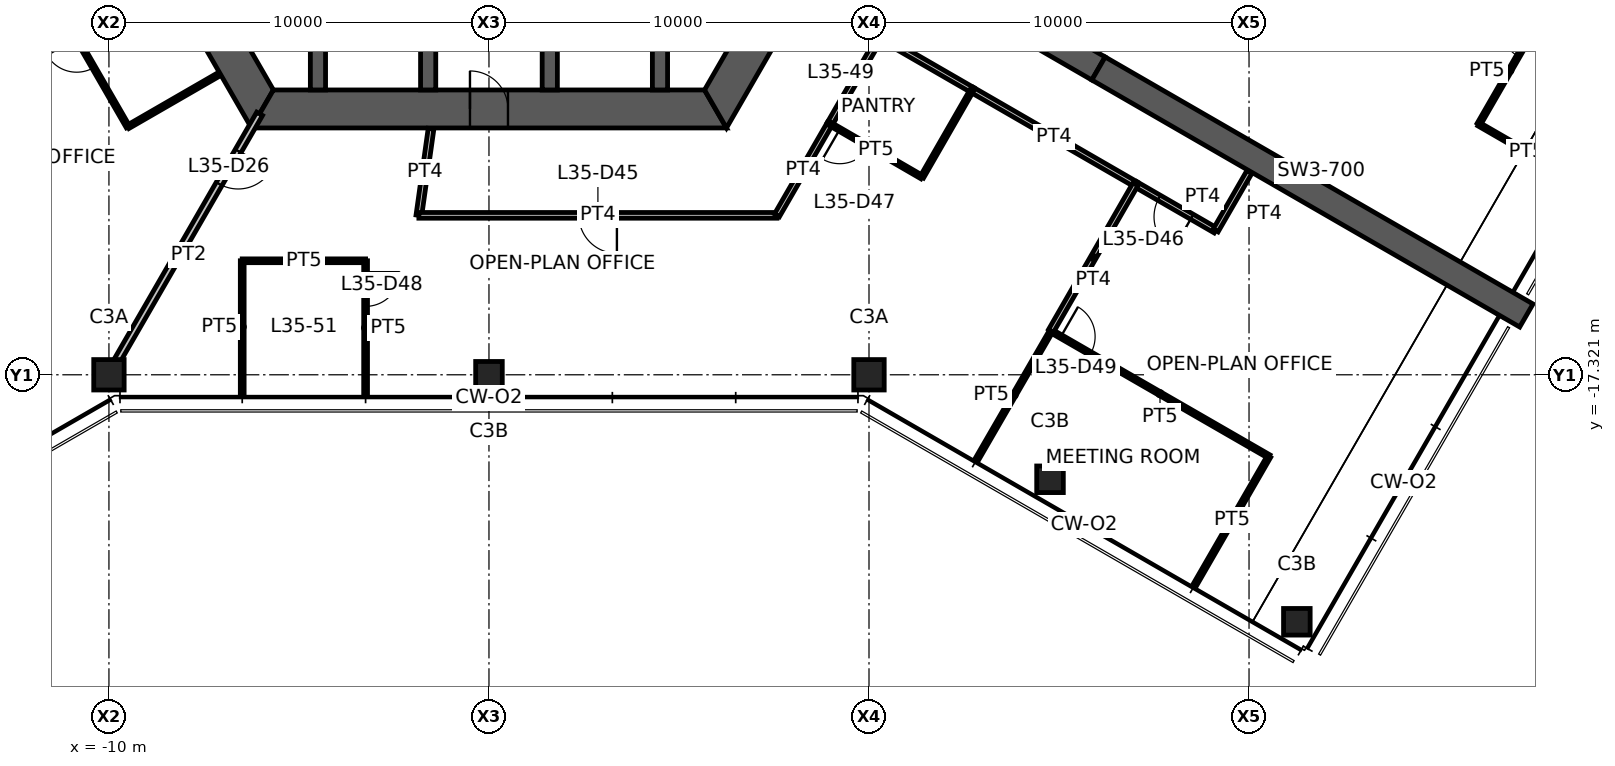
"""IFC4 building model, lengths in metres.
Left out: names, types, materials, properties, quantities, classifications, styles, units other than length and angle.
Written with IfcOpenShell. Run it as: python <this file> out.ifc"""

import sys

from ifc_helpers import new_model, si_unit, direction, frame, frame_2d, origin, origin_2d, place, context, subcontext, project, spatial, polyline, rectangle, hollow_rectangle, outline, extrude, element, fill, save


model = new_model("IFC4")
c1 = context("Model", 3, precision=1e-05, world=origin(), true_north=direction((0.0, 1.0)))
c2 = subcontext(c1, "Body", "Model", "MODEL_VIEW")
j1 = project(units=[si_unit("LENGTHUNIT", "METRE"), si_unit("PLANEANGLEUNIT", "RADIAN")], contexts=[c1])
p1 = place(None, origin())
s1 = spatial("IfcSite", under=j1, at=p1, CompositionType="ELEMENT")
p2 = place(p1, origin())
s2 = spatial("IfcBuilding", under=s1, at=p2, CompositionType="ELEMENT")
p3 = place(p2, frame((0.0, 0.0, 140.9)))
s3 = spatial("IfcBuildingStorey", under=s2, at=p3, CompositionType="ELEMENT", Elevation=140.9)
for number, where, z_axis, x_axis in (
    (1, (-10.0, -17.321, 0.0), (0.0, 0.0, 1.0), (1.0, 0.0, 0.0)),
    (2, (10.0, -17.321, 0.0), (0.0, 0.0, 1.0), (1.0, 0.0, 0.0)),
):
    element("IfcColumn", number, at=place(p3, frame(where, z_axis=z_axis, x_axis=x_axis)), inside=s3, PredefinedType="COLUMN", context=c2, shape_type="SweptSolid", body=[
        extrude(hollow_rectangle(XDim=0.8, YDim=0.8, WallThickness=0.045, at=origin_2d()), origin(), (0.0, 0.0, 1.0), 3.9),
    ])
for number, where, z_axis, x_axis in (
    (3, (0.0, -17.321, 0.0), (0.0, 0.0, 1.0), (1.0, 0.0, 0.0)),
    (4, (14.763, -20.071, 0.0), (0.0, 0.0, 1.0), (1.0, 0.0, 0.0)),
    (5, (21.258, -23.821, 0.0), (0.0, 0.0, 1.0), (1.0, 0.0, 0.0)),
):
    element("IfcColumn", number, at=place(p3, frame(where, z_axis=z_axis, x_axis=x_axis)), inside=s3, PredefinedType="COLUMN", context=c2, shape_type="SweptSolid", body=[
        extrude(hollow_rectangle(XDim=0.7, YDim=0.7, WallThickness=0.036, at=origin_2d()), origin(), (0.0, 0.0, 1.0), 3.9),
    ])
p4 = place(p3, frame((-11.922, 0.0, 0.0), z_axis=(0.0, 0.0, 1.0), x_axis=(0.500004296715, -0.866022923061, 0.0)))
e6 = element("IfcWall", 6, at=p4, inside=s3, PredefinedType="SHEAR", context=c2, shape_type="SweptSolid", body=[
    extrude(outline(polyline([(-0.289, -0.5), (6.331, -0.5), (7.131, -0.5), (12.211, -0.5), (11.634, 0.5), (7.131, 0.5), (6.331, 0.5), (0.289, 0.5), (-0.289, -0.5)])), origin(), (0.0, 0.0, 1.0), 3.9),
])
p5 = place(p4, frame((6.331, 0.0, 0.0)))
e7 = element("IfcOpeningElement", 7, at=p5, cuts=e6, PredefinedType="OPENING", context=c2, shape_type="SweptSolid", body=[
    extrude(rectangle(XDim=0.8, YDim=2.1, at=frame_2d((0.4, 1.05))), frame((0.0, 0.51, 0.0), z_axis=(0.0, -1.0, 0.0), x_axis=(1.0, 0.0, 0.0)), (0.0, 0.0, 1.0), 1.02),
])
p6 = place(p3, frame((-5.961, -10.325, 0.0), z_axis=(0.0, 0.0, 1.0), x_axis=(1.0, 0.0, 0.0)))
e8 = element("IfcWall", 8, at=p6, inside=s3, PredefinedType="SHEAR", context=c2, shape_type="SweptSolid", body=[
    extrude(outline(polyline([(-0.289, -0.5), (5.461, -0.5), (6.461, -0.5), (12.211, -0.5), (11.634, 0.5), (6.461, 0.5), (5.461, 0.5), (0.289, 0.5), (-0.289, -0.5)])), origin(), (0.0, 0.0, 1.0), 3.9),
])
p7 = place(p6, frame((5.461, 0.0, 0.0)))
e9 = element("IfcOpeningElement", 9, at=p7, cuts=e8, PredefinedType="OPENING", context=c2, shape_type="SweptSolid", body=[
    extrude(rectangle(XDim=1.0, YDim=2.1, at=frame_2d((0.5, 1.05))), frame((0.0, 0.51, 0.0), z_axis=(0.0, -1.0, 0.0), x_axis=(1.0, 0.0, 0.0)), (0.0, 0.0, 1.0), 1.02),
])
p8 = place(p3, frame((5.961, -10.325, 0.0), z_axis=(0.0, 0.0, 1.0), x_axis=(0.500004296715, 0.866022923061, 0.0)))
e10 = element("IfcWall", 10, at=p8, inside=s3, PredefinedType="SHEAR", context=c2, shape_type="SweptSolid", body=[
    extrude(outline(polyline([(-0.289, -0.5), (4.594, -0.5), (5.394, -0.5), (12.211, -0.5), (11.634, 0.5), (5.394, 0.5), (4.594, 0.5), (0.289, 0.5), (-0.289, -0.5)])), origin(), (0.0, 0.0, 1.0), 3.9),
])
p9 = place(p8, frame((4.594, 0.0, 0.0)))
e11 = element("IfcOpeningElement", 11, at=p9, cuts=e10, PredefinedType="OPENING", context=c2, shape_type="SweptSolid", body=[
    extrude(rectangle(XDim=0.8, YDim=2.1, at=frame_2d((0.4, 1.05))), frame((0.0, 0.51, 0.0), z_axis=(0.0, -1.0, 0.0), x_axis=(1.0, 0.0, 0.0)), (0.0, 0.0, 1.0), 1.02),
])
p10 = place(p3, frame((-9.375, -5.413, 0.0), z_axis=(0.0, 0.0, 1.0), x_axis=(-0.866032377459, -0.499987921047, 0.0)))
e12 = element("IfcWall", 12, at=p10, inside=s3, PredefinedType="SHEAR", context=c2, shape_type="SweptSolid", body=[
    extrude(rectangle(XDim=7.696, YDim=0.7, at=frame_2d((3.848, 0.0))), origin(), (0.0, 0.0, 1.0), 3.9),
])
p11 = place(p10, frame((0.9, 0.0, 0.0)))
e13 = element("IfcOpeningElement", 13, at=p11, cuts=e12, PredefinedType="OPENING", context=c2, shape_type="SweptSolid", body=[
    extrude(rectangle(XDim=1.0, YDim=2.1, at=frame_2d((0.5, 1.05))), frame((0.0, 0.36, 0.0), z_axis=(0.0, -1.0, 0.0), x_axis=(1.0, 0.0, 0.0)), (0.0, 0.0, 1.0), 0.72),
])
p12 = place(p3, frame((9.375, -5.413, 0.0), z_axis=(0.0, 0.0, 1.0), x_axis=(0.866032377459, -0.499987921047, 0.0)))
e14 = element("IfcWall", 14, at=p12, inside=s3, PredefinedType="SHEAR", context=c2, shape_type="SweptSolid", body=[
    extrude(rectangle(XDim=7.696, YDim=0.7, at=frame_2d((3.848, 0.0))), origin(), (0.0, 0.0, 1.0), 3.9),
])
p13 = place(p12, frame((0.9, 0.0, 0.0)))
e15 = element("IfcOpeningElement", 15, at=p13, cuts=e14, PredefinedType="OPENING", context=c2, shape_type="SweptSolid", body=[
    extrude(rectangle(XDim=1.0, YDim=2.1, at=frame_2d((0.5, 1.05))), frame((0.0, 0.36, 0.0), z_axis=(0.0, -1.0, 0.0), x_axis=(1.0, 0.0, 0.0)), (0.0, 0.0, 1.0), 0.72),
])
p14 = place(p3, frame((16.039, -9.26, 0.0), z_axis=(0.0, 0.0, 1.0), x_axis=(0.866024837091, -0.50000098154, 0.0)))
e16 = element("IfcWall", 16, at=p14, inside=s3, PredefinedType="SHEAR", context=c2, shape_type="SweptSolid", body=[
    extrude(rectangle(XDim=13.0, YDim=0.7, at=frame_2d((6.5, 0.0))), origin(), (0.0, 0.0, 1.0), 3.9),
])
p15 = place(p3, frame((-1.6, -3.8, 0.0), z_axis=(0.0, 0.0, 1.0), x_axis=(0.0, -1.0, 0.0)))
e17 = element("IfcWall", 17, at=p15, inside=s3, PredefinedType="SHEAR", context=c2, shape_type="SweptSolid", body=[
    extrude(rectangle(XDim=6.025, YDim=0.4, at=frame_2d((3.012, 0.0))), origin(), (0.0, 0.0, 1.0), 3.9),
])
p16 = place(p15, frame((3.75, 0.0, 0.0)))
e18 = element("IfcOpeningElement", 18, at=p16, cuts=e17, PredefinedType="OPENING", context=c2, shape_type="SweptSolid", body=[
    extrude(rectangle(XDim=0.9, YDim=2.1, at=frame_2d((0.45, 1.05))), frame((0.0, 0.21, 0.0), z_axis=(0.0, -1.0, 0.0), x_axis=(1.0, 0.0, 0.0)), (0.0, 0.0, 1.0), 0.42),
])
p17 = place(p3, frame((1.6, -3.8, 0.0), z_axis=(0.0, 0.0, 1.0), x_axis=(0.0, -1.0, 0.0)))
e19 = element("IfcWall", 19, at=p17, inside=s3, PredefinedType="SHEAR", context=c2, shape_type="SweptSolid", body=[
    extrude(rectangle(XDim=6.025, YDim=0.4, at=frame_2d((3.012, 0.0))), origin(), (0.0, 0.0, 1.0), 3.9),
])
p18 = place(p17, frame((3.6, 0.0, 0.0)))
e20 = element("IfcOpeningElement", 20, at=p18, cuts=e19, PredefinedType="OPENING", context=c2, shape_type="SweptSolid", body=[
    extrude(rectangle(XDim=1.2, YDim=2.1, at=frame_2d((0.6, 1.05))), frame((0.0, 0.21, 0.0), z_axis=(0.0, -1.0, 0.0), x_axis=(1.0, 0.0, 0.0)), (0.0, 0.0, 1.0), 0.42),
])
for number, where, z_axis, x_axis in (
    (21, (-4.5, -3.8, 0.0), (0.0, 0.0, 1.0), (0.0, -1.0, 0.0)),
    (22, (4.5, -3.8, 0.0), (0.0, 0.0, 1.0), (0.0, -1.0, 0.0)),
):
    element("IfcWall", number, at=place(p3, frame(where, z_axis=z_axis, x_axis=x_axis)), inside=s3, PredefinedType="SHEAR", context=c2, shape_type="SweptSolid", body=[
        extrude(rectangle(XDim=6.025, YDim=0.4, at=frame_2d((3.012, 0.0))), origin(), (0.0, 0.0, 1.0), 3.9),
    ])
p19 = place(p3, frame((-6.035, -10.453, 0.0), z_axis=(0.0, 0.0, 1.0), x_axis=(-0.499989830942, -0.866031274813, 0.0)))
e23 = element("IfcWall", 23, at=p19, inside=s3, PredefinedType="PARTITIONING", context=c2, shape_type="SweptSolid", body=[
    extrude(rectangle(XDim=7.93, YDim=0.175, at=frame_2d((3.965, 0.0))), origin(), (0.0, 0.0, 1.0), 3.05),
])
p20 = place(p19, frame((1.13, 0.0, 0.0)))
e24 = element("IfcOpeningElement", 24, at=p20, cuts=e23, PredefinedType="OPENING", context=c2, shape_type="SweptSolid", body=[
    extrude(rectangle(XDim=1.0, YDim=2.1, at=frame_2d((0.5, 1.05))), frame((0.0, 0.098, 0.0), z_axis=(0.0, -1.0, 0.0), x_axis=(1.0, 0.0, 0.0)), (0.0, 0.0, 1.0), 0.195),
])
p21 = place(p3, frame((-9.5, -10.796, 0.0), z_axis=(0.0, 0.0, 1.0), x_axis=(-0.499990139034, 0.866031096941, 0.0)))
e25 = element("IfcWall", 25, at=p21, inside=s3, PredefinedType="PARTITIONING", context=c2, shape_type="SweptSolid", body=[
    extrude(rectangle(XDim=3.0, YDim=0.1, at=frame_2d((1.5, 0.0))), origin(), (0.0, 0.0, 1.0), 2.95),
])
p22 = place(p21, frame((1.8, 0.0, 0.0)))
e26 = element("IfcOpeningElement", 26, at=p22, cuts=e25, PredefinedType="OPENING", context=c2, shape_type="SweptSolid", body=[
    extrude(rectangle(XDim=0.9, YDim=2.1, at=frame_2d((0.45, 1.05))), frame((0.0, 0.06, 0.0), z_axis=(0.0, -1.0, 0.0), x_axis=(1.0, 0.0, 0.0)), (0.0, 0.0, 1.0), 0.12),
])
p23 = place(p3, frame((-7.092, -9.406, 0.0), z_axis=(0.0, 0.0, 1.0), x_axis=(-0.86603494908, -0.499983466698, 0.0)))
e27 = element("IfcWall", 27, at=p23, inside=s3, PredefinedType="PARTITIONING", context=c2, shape_type="SweptSolid", body=[
    extrude(rectangle(XDim=2.78, YDim=0.1, at=frame_2d((1.39, 0.0))), origin(), (0.0, 0.0, 1.0), 2.95),
])
p24 = place(p3, frame((26.046, -10.727, 0.0), z_axis=(0.0, 0.0, 1.0), x_axis=(0.499765599164, 0.866160692881, 0.0)))
e28 = element("IfcWall", 28, at=p24, inside=s3, PredefinedType="PARTITIONING", context=c2, shape_type="SweptSolid", body=[
    extrude(rectangle(XDim=3.266, YDim=0.1, at=frame_2d((1.633, 0.0))), origin(), (0.0, 0.0, 1.0), 2.95),
])
p25 = place(p24, frame((2.066, 0.0, 0.0)))
e29 = element("IfcOpeningElement", 29, at=p25, cuts=e28, PredefinedType="OPENING", context=c2, shape_type="SweptSolid", body=[
    extrude(rectangle(XDim=0.9, YDim=2.1, at=frame_2d((0.45, 1.05))), frame((0.0, 0.06, 0.0), z_axis=(0.0, -1.0, 0.0), x_axis=(1.0, 0.0, 0.0)), (0.0, 0.0, 1.0), 0.12),
])
p26 = place(p3, frame((28.562, -12.18, 0.0), z_axis=(0.0, 0.0, 1.0), x_axis=(-0.866031657677, 0.499989167784, 0.0)))
e30 = element("IfcWall", 30, at=p26, inside=s3, PredefinedType="PARTITIONING", context=c2, shape_type="SweptSolid", body=[
    extrude(rectangle(XDim=2.905, YDim=0.1, at=frame_2d((1.453, 0.0))), origin(), (0.0, 0.0, 1.0), 2.95),
])
p27 = place(p3, frame((10.292, -8.425, 0.0), z_axis=(0.0, 0.0, 1.0), x_axis=(-0.499966561876, -0.866044708433, 0.0)))
e31 = element("IfcWall", 31, at=p27, inside=s3, PredefinedType="PARTITIONING", context=c2, shape_type="SweptSolid", body=[
    extrude(rectangle(XDim=2.655, YDim=0.15, at=frame_2d((1.328, 0.0))), origin(), (0.0, 0.0, 1.0), 2.95),
])
p28 = place(p3, frame((12.721, -9.827, 0.0), z_axis=(0.0, 0.0, 1.0), x_axis=(-0.866049342339, 0.499958534914, 0.0)))
e32 = element("IfcWall", 32, at=p28, inside=s3, PredefinedType="PARTITIONING", context=c2, shape_type="SweptSolid", body=[
    extrude(rectangle(XDim=2.805, YDim=0.15, at=frame_2d((1.402, 0.0))), origin(), (0.0, 0.0, 1.0), 2.95),
])
p29 = place(p3, frame((-1.844, -13.125, 0.0), z_axis=(0.0, 0.0, 1.0), x_axis=(0.139119980631, 0.990275532864, 0.0)))
e33 = element("IfcWall", 33, at=p29, inside=s3, PredefinedType="PARTITIONING", context=c2, shape_type="SweptSolid", body=[
    extrude(rectangle(XDim=2.302, YDim=0.15, at=frame_2d((1.151, 0.0))), origin(), (0.0, 0.0, 1.0), 2.95),
])
p30 = place(p3, frame((7.578, -13.125, 0.0), z_axis=(0.0, 0.0, 1.0), x_axis=(-1.0, 0.0, 0.0)))
e34 = element("IfcWall", 34, at=p30, inside=s3, PredefinedType="PARTITIONING", context=c2, shape_type="SweptSolid", body=[
    extrude(rectangle(XDim=9.422, YDim=0.15, at=frame_2d((4.711, 0.0))), origin(), (0.0, 0.0, 1.0), 2.95),
])
p31 = place(p30, frame((4.211, 0.0, 0.0)))
e35 = element("IfcOpeningElement", 35, at=p31, cuts=e34, PredefinedType="OPENING", context=c2, shape_type="SweptSolid", body=[
    extrude(rectangle(XDim=1.0, YDim=2.1, at=frame_2d((0.5, 1.05))), frame((0.0, 0.085, 0.0), z_axis=(0.0, -1.0, 0.0), x_axis=(1.0, 0.0, 0.0)), (0.0, 0.0, 1.0), 0.17),
])
p32 = place(p3, frame((8.969, -10.716, 0.0), z_axis=(0.0, 0.0, 1.0), x_axis=(-0.500008568482, -0.866020456713, 0.0)))
e36 = element("IfcWall", 36, at=p32, inside=s3, PredefinedType="PARTITIONING", context=c2, shape_type="SweptSolid", body=[
    extrude(rectangle(XDim=2.782, YDim=0.15, at=frame_2d((1.391, 0.0))), origin(), (0.0, 0.0, 1.0), 2.95),
])
p33 = place(p3, frame((17.021, -12.31, 0.0), z_axis=(0.0, 0.0, 1.0), x_axis=(-0.866018071205, 0.500012700186, 0.0)))
e37 = element("IfcWall", 37, at=p33, inside=s3, PredefinedType="PARTITIONING", context=c2, shape_type="SweptSolid", body=[
    extrude(rectangle(XDim=4.975, YDim=0.15, at=frame_2d((2.488, 0.0))), origin(), (0.0, 0.0, 1.0), 2.95),
])
p34 = place(p3, frame((19.121, -13.522, 0.0), z_axis=(0.0, 0.0, 1.0), x_axis=(-0.866000196749, 0.500043657324, 0.0)))
e38 = element("IfcWall", 38, at=p34, inside=s3, PredefinedType="PARTITIONING", context=c2, shape_type="SweptSolid", body=[
    extrude(rectangle(XDim=2.434, YDim=0.15, at=frame_2d((1.217, 0.0))), origin(), (0.0, 0.0, 1.0), 2.95),
])
p35 = place(p34, frame((0.717, 0.0, 0.0)))
e39 = element("IfcOpeningElement", 39, at=p35, cuts=e38, PredefinedType="OPENING", context=c2, shape_type="SweptSolid", body=[
    extrude(rectangle(XDim=1.0, YDim=2.1, at=frame_2d((0.5, 1.05))), frame((0.0, 0.085, 0.0), z_axis=(0.0, -1.0, 0.0), x_axis=(1.0, 0.0, 0.0)), (0.0, 0.0, 1.0), 0.17),
])
p36 = place(p3, frame((20.011, -11.981, 0.0), z_axis=(0.0, 0.0, 1.0), x_axis=(-0.500062787734, -0.865989150234, 0.0)))
e40 = element("IfcWall", 40, at=p36, inside=s3, PredefinedType="PARTITIONING", context=c2, shape_type="SweptSolid", body=[
    extrude(rectangle(XDim=1.78, YDim=0.15, at=frame_2d((0.89, 0.0))), origin(), (0.0, 0.0, 1.0), 2.95),
])
p37 = place(p3, frame((11.392, -12.119, 0.0), z_axis=(0.0, 0.0, 1.0), x_axis=(-0.865255114713, 0.501331812737, 0.0)))
e41 = element("IfcWall", 41, at=p37, inside=s3, PredefinedType="PARTITIONING", context=c2, shape_type="SweptSolid", body=[
    extrude(rectangle(XDim=2.8, YDim=0.1, at=frame_2d((1.4, 0.0))), origin(), (0.0, 0.0, 1.0), 2.95),
])
p38 = place(p37, frame((1.6, 0.0, 0.0)))
e42 = element("IfcOpeningElement", 42, at=p38, cuts=e41, PredefinedType="OPENING", context=c2, shape_type="SweptSolid", body=[
    extrude(rectangle(XDim=0.9, YDim=2.1, at=frame_2d((0.45, 1.05))), frame((0.0, 0.06, 0.0), z_axis=(0.0, -1.0, 0.0), x_axis=(1.0, 0.0, 0.0)), (0.0, 0.0, 1.0), 0.12),
])
p39 = place(p3, frame((12.713, -9.822, 0.0), z_axis=(0.0, 0.0, 1.0), x_axis=(-0.49852824611, -0.866873455488, 0.0)))
e43 = element("IfcWall", 43, at=p39, inside=s3, PredefinedType="PARTITIONING", context=c2, shape_type="SweptSolid", body=[
    extrude(rectangle(XDim=2.65, YDim=0.1, at=frame_2d((1.325, 0.0))), origin(), (0.0, 0.0, 1.0), 2.95),
])
p40 = place(p3, frame((-6.493, -17.801, 0.0), z_axis=(0.0, 0.0, 1.0), x_axis=(0.0, 1.0, 0.0)))
e44 = element("IfcWall", 44, at=p40, inside=s3, PredefinedType="PARTITIONING", context=c2, shape_type="SweptSolid", body=[
    extrude(rectangle(XDim=3.48, YDim=0.1, at=frame_2d((1.74, 0.0))), origin(), (0.0, 0.0, 1.0), 2.95),
])
p41 = place(p3, frame((-6.493, -14.321, 0.0), z_axis=(0.0, 0.0, 1.0), x_axis=(1.0, 0.0, 0.0)))
e45 = element("IfcWall", 45, at=p41, inside=s3, PredefinedType="PARTITIONING", context=c2, shape_type="SweptSolid", body=[
    extrude(rectangle(XDim=3.247, YDim=0.1, at=frame_2d((1.623, 0.0))), origin(), (0.0, 0.0, 1.0), 2.95),
])
p42 = place(p3, frame((-3.246, -14.321, 0.0), z_axis=(0.0, 0.0, 1.0), x_axis=(0.0, -1.0, 0.0)))
e46 = element("IfcWall", 46, at=p42, inside=s3, PredefinedType="PARTITIONING", context=c2, shape_type="SweptSolid", body=[
    extrude(rectangle(XDim=3.53, YDim=0.1, at=frame_2d((1.765, 0.0))), origin(), (0.0, 0.0, 1.0), 2.95),
])
p43 = place(p42, frame((0.3, 0.0, 0.0)))
e47 = element("IfcOpeningElement", 47, at=p43, cuts=e46, PredefinedType="OPENING", context=c2, shape_type="SweptSolid", body=[
    extrude(rectangle(XDim=0.9, YDim=2.1, at=frame_2d((0.45, 1.05))), frame((0.0, 0.06, 0.0), z_axis=(0.0, -1.0, 0.0), x_axis=(1.0, 0.0, 0.0)), (0.0, 0.0, 1.0), 0.12),
])
p44 = place(p3, frame((12.84, -19.543, 0.0), z_axis=(0.0, 0.0, 1.0), x_axis=(0.501092951989, 0.865393467428, 0.0)))
e48 = element("IfcWall", 48, at=p44, inside=s3, PredefinedType="PARTITIONING", context=c2, shape_type="SweptSolid", body=[
    extrude(rectangle(XDim=3.905, YDim=0.1, at=frame_2d((1.953, 0.0))), origin(), (0.0, 0.0, 1.0), 2.95),
])
p45 = place(p3, frame((14.79, -16.165, 0.0), z_axis=(0.0, 0.0, 1.0), x_axis=(0.866359914703, -0.499420161984, 0.0)))
e49 = element("IfcWall", 49, at=p45, inside=s3, PredefinedType="PARTITIONING", context=c2, shape_type="SweptSolid", body=[
    extrude(rectangle(XDim=6.619, YDim=0.1, at=frame_2d((3.31, 0.0))), origin(), (0.0, 0.0, 1.0), 2.95),
])
p46 = place(p45, frame((0.3, 0.0, 0.0)))
e50 = element("IfcOpeningElement", 50, at=p46, cuts=e49, PredefinedType="OPENING", context=c2, shape_type="SweptSolid", body=[
    extrude(rectangle(XDim=0.9, YDim=2.1, at=frame_2d((0.45, 1.05))), frame((0.0, 0.06, 0.0), z_axis=(0.0, -1.0, 0.0), x_axis=(1.0, 0.0, 0.0)), (0.0, 0.0, 1.0), 0.12),
])
p47 = place(p3, frame((20.525, -19.471, 0.0), z_axis=(0.0, 0.0, 1.0), x_axis=(-0.499996613652, -0.866027358884, 0.0)))
e51 = element("IfcWall", 51, at=p47, inside=s3, PredefinedType="PARTITIONING", context=c2, shape_type="SweptSolid", body=[
    extrude(rectangle(XDim=3.88, YDim=0.1, at=frame_2d((1.94, 0.0))), origin(), (0.0, 0.0, 1.0), 2.95),
])
p48 = place(p3, frame((17.013, -12.305, 0.0), z_axis=(0.0, 0.0, 1.0), x_axis=(-0.499081704511, -0.866554933182, 0.0)))
e52 = element("IfcWall", 52, at=p48, inside=s3, PredefinedType="PARTITIONING", context=c2, shape_type="SweptSolid", body=[
    extrude(rectangle(XDim=4.454, YDim=0.15, at=frame_2d((2.227, 0.0))), origin(), (0.0, 0.0, 1.0), 2.95),
])
p49 = place(p7, origin())
e53 = element("IfcDoor", 53, at=p49, inside=s3, OperationType="SINGLE_SWING_LEFT", PredefinedType="DOOR", context=c2, shape_type="SweptSolid", body=[
    extrude(rectangle(XDim=1.0, YDim=2.1, at=frame_2d((0.5, 1.05))), frame((0.0, 0.025, 0.0), z_axis=(0.0, -1.0, 0.0), x_axis=(1.0, 0.0, 0.0)), (0.0, 0.0, 1.0), 0.05),
])
fill(e9, e53)
p50 = place(p20, origin())
e54 = element("IfcDoor", 54, at=p50, inside=s3, OperationType="SINGLE_SWING_LEFT", PredefinedType="DOOR", context=c2, shape_type="SweptSolid", body=[
    extrude(rectangle(XDim=1.0, YDim=2.1, at=frame_2d((0.5, 1.05))), frame((0.0, 0.025, 0.0), z_axis=(0.0, -1.0, 0.0), x_axis=(1.0, 0.0, 0.0)), (0.0, 0.0, 1.0), 0.05),
])
fill(e24, e54)
p51 = place(p22, origin())
e55 = element("IfcDoor", 55, at=p51, inside=s3, OperationType="SINGLE_SWING_RIGHT", PredefinedType="DOOR", context=c2, shape_type="SweptSolid", body=[
    extrude(rectangle(XDim=0.9, YDim=2.1, at=frame_2d((0.45, 1.05))), frame((0.0, 0.025, 0.0), z_axis=(0.0, -1.0, 0.0), x_axis=(1.0, 0.0, 0.0)), (0.0, 0.0, 1.0), 0.05),
])
fill(e26, e55)
p52 = place(p25, origin())
e56 = element("IfcDoor", 56, at=p52, inside=s3, OperationType="SINGLE_SWING_RIGHT", PredefinedType="DOOR", context=c2, shape_type="SweptSolid", body=[
    extrude(rectangle(XDim=0.9, YDim=2.1, at=frame_2d((0.45, 1.05))), frame((0.0, 0.025, 0.0), z_axis=(0.0, -1.0, 0.0), x_axis=(1.0, 0.0, 0.0)), (0.0, 0.0, 1.0), 0.05),
])
fill(e29, e56)
p53 = place(p31, origin())
e57 = element("IfcDoor", 57, at=p53, inside=s3, OperationType="SINGLE_SWING_LEFT", PredefinedType="DOOR", context=c2, shape_type="SweptSolid", body=[
    extrude(rectangle(XDim=1.0, YDim=2.1, at=frame_2d((0.5, 1.05))), frame((0.0, 0.025, 0.0), z_axis=(0.0, -1.0, 0.0), x_axis=(1.0, 0.0, 0.0)), (0.0, 0.0, 1.0), 0.05),
])
fill(e35, e57)
p54 = place(p35, origin())
e58 = element("IfcDoor", 58, at=p54, inside=s3, OperationType="SINGLE_SWING_LEFT", PredefinedType="DOOR", context=c2, shape_type="SweptSolid", body=[
    extrude(rectangle(XDim=1.0, YDim=2.1, at=frame_2d((0.5, 1.05))), frame((0.0, 0.025, 0.0), z_axis=(0.0, -1.0, 0.0), x_axis=(1.0, 0.0, 0.0)), (0.0, 0.0, 1.0), 0.05),
])
fill(e39, e58)
p55 = place(p38, origin())
e59 = element("IfcDoor", 59, at=p55, inside=s3, OperationType="SINGLE_SWING_RIGHT", PredefinedType="DOOR", context=c2, shape_type="SweptSolid", body=[
    extrude(rectangle(XDim=0.9, YDim=2.1, at=frame_2d((0.45, 1.05))), frame((0.0, 0.025, 0.0), z_axis=(0.0, -1.0, 0.0), x_axis=(1.0, 0.0, 0.0)), (0.0, 0.0, 1.0), 0.05),
])
fill(e42, e59)
p56 = place(p43, origin())
e60 = element("IfcDoor", 60, at=p56, inside=s3, OperationType="SINGLE_SWING_LEFT", PredefinedType="DOOR", context=c2, shape_type="SweptSolid", body=[
    extrude(rectangle(XDim=0.9, YDim=2.1, at=frame_2d((0.45, 1.05))), frame((0.0, 0.025, 0.0), z_axis=(0.0, -1.0, 0.0), x_axis=(1.0, 0.0, 0.0)), (0.0, 0.0, 1.0), 0.05),
])
fill(e47, e60)
p57 = place(p46, origin())
e61 = element("IfcDoor", 61, at=p57, inside=s3, OperationType="SINGLE_SWING_LEFT", PredefinedType="DOOR", context=c2, shape_type="SweptSolid", body=[
    extrude(rectangle(XDim=0.9, YDim=2.1, at=frame_2d((0.45, 1.05))), frame((0.0, 0.025, 0.0), z_axis=(0.0, -1.0, 0.0), x_axis=(1.0, 0.0, 0.0)), (0.0, 0.0, 1.0), 0.05),
])
fill(e50, e61)
save(model, sys.argv[1])
